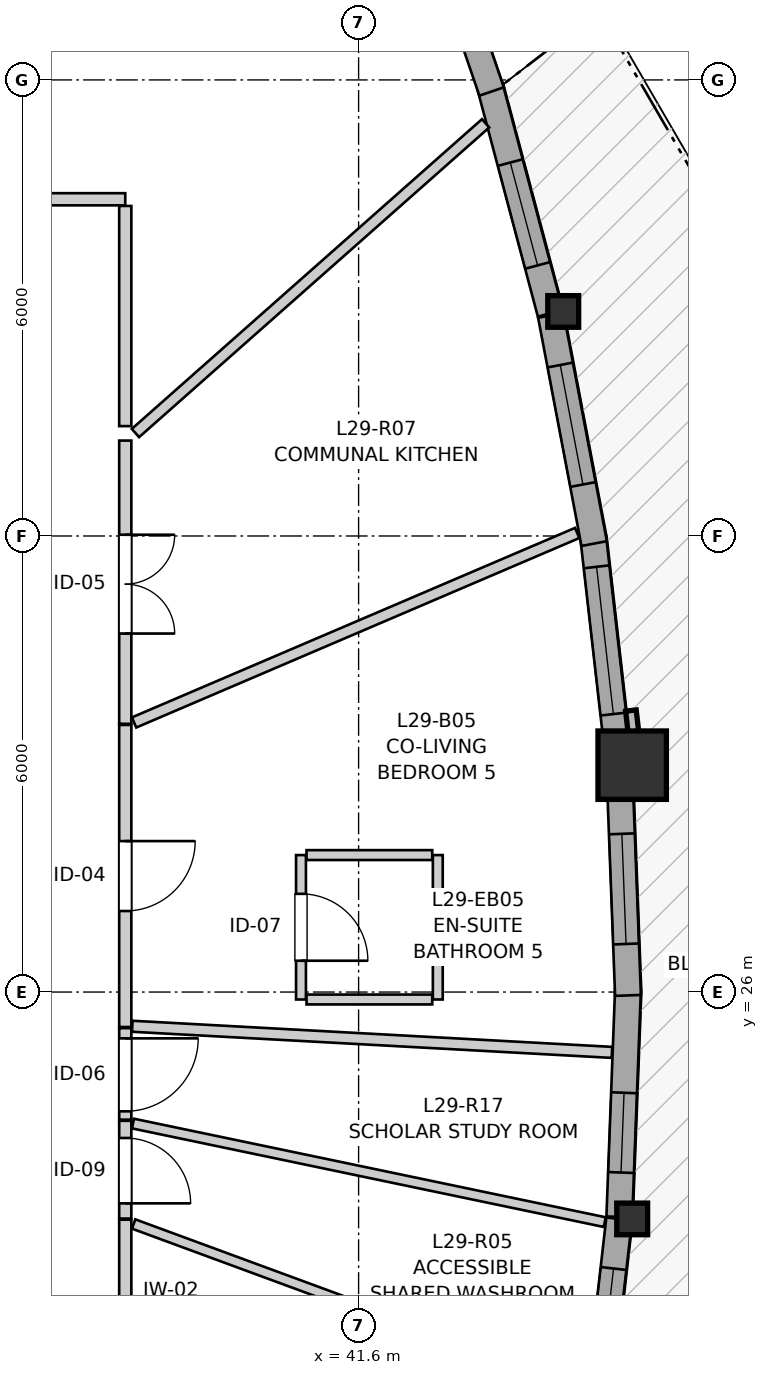
"""IFC4 building model, lengths in metres.
Left out: names, types, materials, properties, quantities, classifications, styles, units other than length and angle.
Written with IfcOpenShell. Run it as: python <this file> out.ifc"""

import sys

from ifc_helpers import new_model, si_unit, direction, frame, frame_2d, origin, origin_2d, place, context, subcontext, project, spatial, rectangle, i_section, extrude, source, transform, mapped, element, fill, save


model = new_model("IFC4")
c1 = context("Model", 3, precision=1e-05, world=origin(), true_north=direction((0.0, 1.0)))
c2 = subcontext(c1, "Body", "Model", "MODEL_VIEW")
j1 = project(units=[si_unit("LENGTHUNIT", "METRE"), si_unit("PLANEANGLEUNIT", "RADIAN")], contexts=[c1])
p1 = place(None, origin())
s1 = spatial("IfcSite", under=j1, at=p1, CompositionType="ELEMENT")
p2 = place(p1, origin())
s2 = spatial("IfcBuilding", under=s1, at=p2, CompositionType="ELEMENT")
p3 = place(p2, frame((0.0, 0.0, 99.2)))
s3 = spatial("IfcBuildingStorey", under=s2, at=p3, CompositionType="ELEMENT", Elevation=99.2)
m1 = source(origin(), c2, "Body", "SweptSolid", [
    extrude(i_section(OverallWidth=0.406, OverallDepth=0.416, WebThickness=0.027, FlangeThickness=0.044, FilletRadius=0.015, at=origin_2d()), origin(), (0.0, 0.0, 1.0), 2.95),
])
p4 = place(p3, frame((45.199, 23.015, 0.0), z_axis=(0.0, 0.0, 1.0), x_axis=(1.0, 0.0, 0.0)))
e1 = element("IfcColumn", 1, at=p4, inside=s3, PredefinedType="PILASTER", context=c2, shape_type="MappedRepresentation", body=[
    mapped(m1, transform((0.0, 0.0, 0.0), x_axis=(1.0, 0.0, 0.0), y_axis=(0.0, 1.0, 0.0), z_axis=(0.0, 0.0, 1.0), scale=1.0)),
])
m2 = source(origin(), c2, "Body", "SweptSolid", [
    extrude(rectangle(XDim=0.9, YDim=0.9, at=origin_2d()), origin(), (0.0, 0.0, 1.0), 2.95),
])
p5 = place(p3, frame((45.199, 28.985, 0.0), z_axis=(0.0, 0.0, 1.0), x_axis=(1.0, 0.0, 0.0)))
e2 = element("IfcColumn", 2, at=p5, inside=s3, PredefinedType="COLUMN", context=c2, shape_type="MappedRepresentation", body=[
    mapped(m2, transform((0.0, 0.0, 0.0), x_axis=(1.0, 0.0, 0.0), y_axis=(0.0, 1.0, 0.0), z_axis=(0.0, 0.0, 1.0), scale=1.0)),
])
p6 = place(p3, frame((44.292, 34.954, 0.0), z_axis=(0.0, 0.0, 1.0), x_axis=(1.0, 0.0, 0.0)))
e3 = element("IfcColumn", 3, at=p6, inside=s3, PredefinedType="PILASTER", context=c2, shape_type="MappedRepresentation", body=[
    mapped(m1, transform((0.0, 0.0, 0.0), x_axis=(1.0, 0.0, 0.0), y_axis=(0.0, 1.0, 0.0), z_axis=(0.0, 0.0, 1.0), scale=1.0)),
])
p7 = place(p3, frame((44.686, 20.012, 0.0), z_axis=(0.0, 0.0, 1.0), x_axis=(0.113268604106, 0.993564403209, 0.0)))
e4 = element("IfcWall", 4, at=p7, inside=s3, PredefinedType="SOLIDWALL", context=c2, shape_type="SweptSolid", body=[
    extrude(rectangle(XDim=3.022, YDim=0.34, at=frame_2d((1.511, 0.0))), origin(), (0.0, 0.0, 1.0), 2.48),
])
p8 = place(p7, frame((1.316, 0.0, 0.82)))
e5 = element("IfcOpeningElement", 5, at=p8, cuts=e4, PredefinedType="OPENING", context=c2, shape_type="SweptSolid", body=[
    extrude(rectangle(XDim=1.05, YDim=1.45, at=frame_2d((0.525, 0.725))), frame((0.0, 0.18, 0.0), z_axis=(0.0, -1.0, 0.0), x_axis=(1.0, 0.0, 0.0)), (0.0, 0.0, 1.0), 0.36),
])
p9 = place(p3, frame((45.031, 23.042, 0.0), z_axis=(0.0, 0.0, 1.0), x_axis=(0.037943223979, 0.999279896603, 0.0)))
e6 = element("IfcWall", 6, at=p9, inside=s3, PredefinedType="SOLIDWALL", context=c2, shape_type="SweptSolid", body=[
    extrude(rectangle(XDim=3.005, YDim=0.34, at=frame_2d((1.502, 0.0))), origin(), (0.0, 0.0, 1.0), 2.48),
])
p10 = place(p9, frame((0.584, 0.0, 0.82)))
e7 = element("IfcOpeningElement", 7, at=p10, cuts=e6, PredefinedType="OPENING", context=c2, shape_type="SweptSolid", body=[
    extrude(rectangle(XDim=1.05, YDim=1.45, at=frame_2d((0.525, 0.725))), frame((0.0, 0.18, 0.0), z_axis=(0.0, -1.0, 0.0), x_axis=(1.0, 0.0, 0.0)), (0.0, 0.0, 1.0), 0.36),
])
p11 = place(p3, frame((45.145, 25.956, 0.0), z_axis=(0.0, 0.0, 1.0), x_axis=(-0.038000333161, 0.9992777265, 0.0)))
e8 = element("IfcWall", 8, at=p11, inside=s3, PredefinedType="SOLIDWALL", context=c2, shape_type="SweptSolid", body=[
    extrude(rectangle(XDim=2.795, YDim=0.34, at=frame_2d((1.397, 0.0))), origin(), (0.0, 0.0, 1.0), 2.48),
])
p12 = place(p11, frame((0.677, 0.0, 0.82)))
e9 = element("IfcOpeningElement", 9, at=p12, cuts=e8, PredefinedType="OPENING", context=c2, shape_type="SweptSolid", body=[
    extrude(rectangle(XDim=1.45, YDim=1.25, at=frame_2d((0.725, 0.625))), frame((0.0, 0.18, 0.0), z_axis=(0.0, -1.0, 0.0), x_axis=(1.0, 0.0, 0.0)), (0.0, 0.0, 1.0), 0.36),
])
p13 = place(p3, frame((45.004, 29.194, 0.0), z_axis=(0.0, 0.0, 1.0), x_axis=(-0.113223342564, 0.993569562083, 0.0)))
e10 = element("IfcWall", 10, at=p13, inside=s3, PredefinedType="SOLIDWALL", context=c2, shape_type="SweptSolid", body=[
    extrude(rectangle(XDim=2.812, YDim=0.34, at=frame_2d((1.406, 0.0))), origin(), (0.0, 0.0, 1.0), 2.48),
])
p14 = place(p13, frame((0.466, 0.0, 0.82)))
e11 = element("IfcOpeningElement", 11, at=p14, cuts=e10, PredefinedType="OPENING", context=c2, shape_type="SweptSolid", body=[
    extrude(rectangle(XDim=1.95, YDim=1.4, at=frame_2d((0.975, 0.7))), frame((0.0, 0.18, 0.0), z_axis=(0.0, -1.0, 0.0), x_axis=(1.0, 0.0, 0.0)), (0.0, 0.0, 1.0), 0.36),
])
p15 = place(p3, frame((44.699, 31.9, 0.0), z_axis=(0.0, 0.0, 1.0), x_axis=(-0.186689944156, 0.982418884566, 0.0)))
e12 = element("IfcWall", 12, at=p15, inside=s3, PredefinedType="SOLIDWALL", context=c2, shape_type="SweptSolid", body=[
    extrude(rectangle(XDim=3.056, YDim=0.34, at=frame_2d((1.528, 0.0))), origin(), (0.0, 0.0, 1.0), 2.48),
])
p16 = place(p15, frame((0.791, 0.0, 0.82)))
e13 = element("IfcOpeningElement", 13, at=p16, cuts=e12, PredefinedType="OPENING", context=c2, shape_type="SweptSolid", body=[
    extrude(rectangle(XDim=1.6, YDim=1.35, at=frame_2d((0.8, 0.675))), frame((0.0, 0.18, 0.0), z_axis=(0.0, -1.0, 0.0), x_axis=(1.0, 0.0, 0.0)), (0.0, 0.0, 1.0), 0.36),
])
p17 = place(p3, frame((44.123, 34.93, 0.0), z_axis=(0.0, 0.0, 1.0), x_axis=(-0.257080487516, 0.96638999526, 0.0)))
e14 = element("IfcWall", 14, at=p17, inside=s3, PredefinedType="SOLIDWALL", context=c2, shape_type="SweptSolid", body=[
    extrude(rectangle(XDim=3.106, YDim=0.34, at=frame_2d((1.553, 0.0))), origin(), (0.0, 0.0, 1.0), 2.48),
])
p18 = place(p17, frame((0.652, 0.0, 0.82)))
e15 = element("IfcOpeningElement", 15, at=p18, cuts=e14, PredefinedType="OPENING", context=c2, shape_type="SweptSolid", body=[
    extrude(rectangle(XDim=1.4, YDim=1.35, at=frame_2d((0.7, 0.675))), frame((0.0, 0.18, 0.0), z_axis=(0.0, -1.0, 0.0), x_axis=(1.0, 0.0, 0.0)), (0.0, 0.0, 1.0), 0.36),
])
p19 = place(p3, frame((43.35, 37.848, 0.0), z_axis=(0.0, 0.0, 1.0), x_axis=(-0.323561473353, 0.946207151189, 0.0)))
e16 = element("IfcWall", 16, at=p19, inside=s3, PredefinedType="SOLIDWALL", context=c2, shape_type="SweptSolid", body=[
    extrude(rectangle(XDim=2.962, YDim=0.34, at=frame_2d((1.481, 0.0))), origin(), (0.0, 0.0, 1.0), 2.48),
])
p20 = place(p19, frame((0.861, 0.0, 0.82)))
e17 = element("IfcOpeningElement", 17, at=p20, cuts=e16, PredefinedType="OPENING", context=c2, shape_type="SweptSolid", body=[
    extrude(rectangle(XDim=1.25, YDim=1.35, at=frame_2d((0.625, 0.675))), frame((0.0, 0.18, 0.0), z_axis=(0.0, -1.0, 0.0), x_axis=(1.0, 0.0, 0.0)), (0.0, 0.0, 1.0), 0.36),
])
p21 = place(p3, frame((38.53, 23.005, 0.0), z_axis=(0.0, 0.0, 1.0), x_axis=(0.0, -1.0, 0.0)))
e18 = element("IfcWall", 18, at=p21, inside=s3, PredefinedType="PARTITIONING", context=c2, shape_type="SweptSolid", body=[
    extrude(rectangle(XDim=6.157, YDim=0.16, at=frame_2d((3.079, 0.0))), origin(), (0.0, 0.0, 1.0), 2.95),
])
p22 = place(p21, frame((2.615, 0.0, 0.0)))
e19 = element("IfcOpeningElement", 19, at=p22, cuts=e18, PredefinedType="OPENING", context=c2, shape_type="SweptSolid", body=[
    extrude(rectangle(XDim=0.92, YDim=2.1, at=frame_2d((0.46, 1.05))), frame((0.0, 0.09, 0.0), z_axis=(0.0, -1.0, 0.0), x_axis=(1.0, 0.0, 0.0)), (0.0, 0.0, 1.0), 0.18),
])
p23 = place(p3, frame((33.906, 36.43, 0.0), z_axis=(0.0, 0.0, 1.0), x_axis=(1.0, 0.0, 0.0)))
e20 = element("IfcWall", 20, at=p23, inside=s3, PredefinedType="PARTITIONING", context=c2, shape_type="SweptSolid", body=[
    extrude(rectangle(XDim=4.624, YDim=0.16, at=frame_2d((2.312, 0.0))), origin(), (0.0, 0.0, 1.0), 2.588),
])
p24 = place(p23, frame((1.84, 0.0, 0.0)))
e21 = element("IfcOpeningElement", 21, at=p24, cuts=e20, PredefinedType="OPENING", context=c2, shape_type="SweptSolid", body=[
    extrude(rectangle(XDim=0.96, YDim=2.1, at=frame_2d((0.48, 1.05))), frame((0.0, 0.09, 0.0), z_axis=(0.0, -1.0, 0.0), x_axis=(1.0, 0.0, 0.0)), (0.0, 0.0, 1.0), 0.18),
])
p25 = place(p3, frame((38.53, 29.514, 0.0), z_axis=(0.0, 0.0, 1.0), x_axis=(0.0, -1.0, 0.0)))
e22 = element("IfcWall", 22, at=p25, inside=s3, PredefinedType="PARTITIONING", context=c2, shape_type="SweptSolid", body=[
    extrude(rectangle(XDim=3.974, YDim=0.16, at=frame_2d((1.987, 0.0))), origin(), (0.0, 0.0, 1.0), 2.95),
])
p26 = place(p25, frame((1.528, 0.0, 0.0)))
e23 = element("IfcOpeningElement", 23, at=p26, cuts=e22, PredefinedType="OPENING", context=c2, shape_type="SweptSolid", body=[
    extrude(rectangle(XDim=0.92, YDim=2.1, at=frame_2d((0.46, 1.05))), frame((0.0, 0.09, 0.0), z_axis=(0.0, -1.0, 0.0), x_axis=(1.0, 0.0, 0.0)), (0.0, 0.0, 1.0), 0.18),
])
p27 = place(p3, frame((38.53, 33.255, 0.0), z_axis=(0.0, 0.0, 1.0), x_axis=(0.0, -1.0, 0.0)))
e24 = element("IfcWall", 24, at=p27, inside=s3, PredefinedType="PARTITIONING", context=c2, shape_type="SweptSolid", body=[
    extrude(rectangle(XDim=3.726, YDim=0.16, at=frame_2d((1.863, 0.0))), origin(), (0.0, 0.0, 1.0), 2.95),
])
p28 = place(p27, frame((1.239, 0.0, 0.0)))
e25 = element("IfcOpeningElement", 25, at=p28, cuts=e24, PredefinedType="OPENING", context=c2, shape_type="SweptSolid", body=[
    extrude(rectangle(XDim=1.3, YDim=2.1, at=frame_2d((0.65, 1.05))), frame((0.0, 0.09, 0.0), z_axis=(0.0, -1.0, 0.0), x_axis=(1.0, 0.0, 0.0)), (0.0, 0.0, 1.0), 0.18),
])
p29 = place(p3, frame((40.842, 27.802, 0.0), z_axis=(0.0, 0.0, 1.0), x_axis=(0.0, -1.0, 0.0)))
e26 = element("IfcWall", 26, at=p29, inside=s3, PredefinedType="PARTITIONING", context=c2, shape_type="SweptSolid", body=[
    extrude(rectangle(XDim=1.9, YDim=0.13, at=frame_2d((0.95, 0.0))), origin(), (0.0, 0.0, 1.0), 2.95),
])
p30 = place(p29, frame((0.51, 0.0, 0.0)))
e27 = element("IfcOpeningElement", 27, at=p30, cuts=e26, PredefinedType="OPENING", context=c2, shape_type="SweptSolid", body=[
    extrude(rectangle(XDim=0.88, YDim=2.05, at=frame_2d((0.44, 1.025))), frame((0.0, 0.075, 0.0), z_axis=(0.0, -1.0, 0.0), x_axis=(1.0, 0.0, 0.0)), (0.0, 0.0, 1.0), 0.15),
])
p31 = place(p3, frame((38.53, 24.306, 0.0), z_axis=(0.0, 0.0, 1.0), x_axis=(0.0, -1.0, 0.0)))
e28 = element("IfcWall", 28, at=p31, inside=s3, PredefinedType="PARTITIONING", context=c2, shape_type="SweptSolid", body=[
    extrude(rectangle(XDim=1.286, YDim=0.16, at=frame_2d((0.643, 0.0))), origin(), (0.0, 0.0, 1.0), 2.95),
])
p32 = place(p31, frame((0.226, 0.0, 0.0)))
e29 = element("IfcOpeningElement", 29, at=p32, cuts=e28, PredefinedType="OPENING", context=c2, shape_type="SweptSolid", body=[
    extrude(rectangle(XDim=0.86, YDim=2.05, at=frame_2d((0.43, 1.025))), frame((0.0, 0.09, 0.0), z_axis=(0.0, -1.0, 0.0), x_axis=(1.0, 0.0, 0.0)), (0.0, 0.0, 1.0), 0.18),
])
p33 = place(p3, frame((38.53, 25.525, 0.0), z_axis=(0.0, 0.0, 1.0), x_axis=(0.0, -1.0, 0.0)))
e30 = element("IfcWall", 30, at=p33, inside=s3, PredefinedType="PARTITIONING", context=c2, shape_type="SweptSolid", body=[
    extrude(rectangle(XDim=1.204, YDim=0.16, at=frame_2d((0.602, 0.0))), origin(), (0.0, 0.0, 1.0), 2.95),
])
p34 = place(p33, frame((0.134, 0.0, 0.0)))
e31 = element("IfcOpeningElement", 31, at=p34, cuts=e30, PredefinedType="OPENING", context=c2, shape_type="SweptSolid", body=[
    extrude(rectangle(XDim=0.96, YDim=2.1, at=frame_2d((0.48, 1.05))), frame((0.0, 0.09, 0.0), z_axis=(0.0, -1.0, 0.0), x_axis=(1.0, 0.0, 0.0)), (0.0, 0.0, 1.0), 0.18),
])
p35 = place(p3, frame((38.646, 29.546, 0.0), z_axis=(0.0, 0.0, 1.0), x_axis=(0.919441504603, 0.393226804293, 0.0)))
e32 = element("IfcWall", 32, at=p35, inside=s3, PredefinedType="PARTITIONING", context=c2, shape_type="SweptSolid", body=[
    extrude(rectangle(XDim=6.341, YDim=0.145, at=frame_2d((3.17, 0.0))), origin(), (0.0, 0.0, 1.0), 2.95),
])
p36 = place(p3, frame((38.64, 22.948, 0.0), z_axis=(0.0, 0.0, 1.0), x_axis=(0.938426101424, -0.3454800315, 0.0)))
e33 = element("IfcWall", 33, at=p36, inside=s3, PredefinedType="PARTITIONING", context=c2, shape_type="SweptSolid", body=[
    extrude(rectangle(XDim=6.327, YDim=0.13, at=frame_2d((3.164, 0.0))), origin(), (0.0, 0.0, 1.0), 2.95),
])
p37 = place(p3, frame((38.631, 24.27, 0.0), z_axis=(0.0, 0.0, 1.0), x_axis=(0.978856283814, -0.204549201019, 0.0)))
e34 = element("IfcWall", 34, at=p37, inside=s3, PredefinedType="PARTITIONING", context=c2, shape_type="SweptSolid", body=[
    extrude(rectangle(XDim=6.341, YDim=0.13, at=frame_2d((3.171, 0.0))), origin(), (0.0, 0.0, 1.0), 2.95),
])
p38 = place(p3, frame((38.622, 25.55, 0.0), z_axis=(0.0, 0.0, 1.0), x_axis=(0.998518036703, -0.054421782211, 0.0)))
e35 = element("IfcWall", 35, at=p38, inside=s3, PredefinedType="PARTITIONING", context=c2, shape_type="SweptSolid", body=[
    extrude(rectangle(XDim=6.321, YDim=0.145, at=frame_2d((3.16, 0.0))), origin(), (0.0, 0.0, 1.0), 2.95),
])
p39 = place(p3, frame((38.664, 33.354, 0.0), z_axis=(0.0, 0.0, 1.0), x_axis=(0.749069296105, 0.662491652501, 0.0)))
e36 = element("IfcWall", 36, at=p39, inside=s3, PredefinedType="PARTITIONING", context=c2, shape_type="SweptSolid", body=[
    extrude(rectangle(XDim=6.15, YDim=0.145, at=frame_2d((3.075, 0.0))), origin(), (0.0, 0.0, 1.0), 2.95),
])
p40 = place(p3, frame((38.53, 33.446, 0.0), z_axis=(0.0, 0.0, 1.0), x_axis=(0.0, 1.0, 0.0)))
e37 = element("IfcWall", 37, at=p40, inside=s3, PredefinedType="PARTITIONING", context=c2, shape_type="SweptSolid", body=[
    extrude(rectangle(XDim=2.896, YDim=0.16, at=frame_2d((1.448, 0.0))), origin(), (0.0, 0.0, 1.0), 2.588),
])
p41 = place(p3, frame((42.642, 25.902, 0.0), z_axis=(0.0, 0.0, 1.0), x_axis=(0.0, 1.0, 0.0)))
e38 = element("IfcWall", 38, at=p41, inside=s3, PredefinedType="PARTITIONING", context=c2, shape_type="SweptSolid", body=[
    extrude(rectangle(XDim=1.9, YDim=0.13, at=frame_2d((0.95, 0.0))), origin(), (0.0, 0.0, 1.0), 2.558),
])
for number, where, z_axis, x_axis in (
    (39, (40.915, 27.802, 0.0), (0.0, 0.0, 1.0), (1.0, 0.0, 0.0)),
    (40, (40.915, 25.902, 0.0), (0.0, 0.0, 1.0), (1.0, 0.0, 0.0)),
):
    element("IfcWall", number, at=place(p3, frame(where, z_axis=z_axis, x_axis=x_axis)), inside=s3, PredefinedType="PARTITIONING", context=c2, shape_type="SweptSolid", body=[
        extrude(rectangle(XDim=1.654, YDim=0.13, at=frame_2d((0.827, 0.0))), origin(), (0.0, 0.0, 1.0), 2.95),
    ])
m3 = source(origin(), c2, "Body", "SweptSolid", [
    extrude(rectangle(XDim=1.05, YDim=1.45, at=frame_2d((0.525, 0.725))), frame((0.0, 0.03, 0.0), z_axis=(0.0, -1.0, 0.0), x_axis=(1.0, 0.0, 0.0)), (0.0, 0.0, 1.0), 0.06),
])
p42 = place(p8, origin())
e41 = element("IfcWindow", 41, at=p42, inside=s3, PartitioningType="SINGLE_PANEL", PredefinedType="WINDOW", context=c2, shape_type="MappedRepresentation", body=[
    mapped(m3, transform((0.0, 0.0, 0.0), x_axis=(1.0, 0.0, 0.0), y_axis=(0.0, 1.0, 0.0), z_axis=(0.0, 0.0, 1.0), scale=1.0)),
])
fill(e5, e41)
p43 = place(p10, origin())
e42 = element("IfcWindow", 42, at=p43, inside=s3, PartitioningType="SINGLE_PANEL", PredefinedType="WINDOW", context=c2, shape_type="MappedRepresentation", body=[
    mapped(m3, transform((0.0, 0.0, 0.0), x_axis=(1.0, 0.0, 0.0), y_axis=(0.0, 1.0, 0.0), z_axis=(0.0, 0.0, 1.0), scale=1.0)),
])
fill(e7, e42)
m4 = source(origin(), c2, "Body", "SweptSolid", [
    extrude(rectangle(XDim=1.45, YDim=1.25, at=frame_2d((0.725, 0.625))), frame((0.0, 0.03, 0.0), z_axis=(0.0, -1.0, 0.0), x_axis=(1.0, 0.0, 0.0)), (0.0, 0.0, 1.0), 0.06),
])
p44 = place(p12, origin())
e43 = element("IfcWindow", 43, at=p44, inside=s3, PartitioningType="SINGLE_PANEL", PredefinedType="WINDOW", context=c2, shape_type="MappedRepresentation", body=[
    mapped(m4, transform((0.0, 0.0, 0.0), x_axis=(1.0, 0.0, 0.0), y_axis=(0.0, 1.0, 0.0), z_axis=(0.0, 0.0, 1.0), scale=1.0)),
])
fill(e9, e43)
m5 = source(origin(), c2, "Body", "SweptSolid", [
    extrude(rectangle(XDim=1.95, YDim=1.4, at=frame_2d((0.975, 0.7))), frame((0.0, 0.03, 0.0), z_axis=(0.0, -1.0, 0.0), x_axis=(1.0, 0.0, 0.0)), (0.0, 0.0, 1.0), 0.06),
])
p45 = place(p14, origin())
e44 = element("IfcWindow", 44, at=p45, inside=s3, PartitioningType="SINGLE_PANEL", PredefinedType="WINDOW", context=c2, shape_type="MappedRepresentation", body=[
    mapped(m5, transform((0.0, 0.0, 0.0), x_axis=(1.0, 0.0, 0.0), y_axis=(0.0, 1.0, 0.0), z_axis=(0.0, 0.0, 1.0), scale=1.0)),
])
fill(e11, e44)
m6 = source(origin(), c2, "Body", "SweptSolid", [
    extrude(rectangle(XDim=1.6, YDim=1.35, at=frame_2d((0.8, 0.675))), frame((0.0, 0.03, 0.0), z_axis=(0.0, -1.0, 0.0), x_axis=(1.0, 0.0, 0.0)), (0.0, 0.0, 1.0), 0.06),
])
p46 = place(p16, origin())
e45 = element("IfcWindow", 45, at=p46, inside=s3, PartitioningType="SINGLE_PANEL", PredefinedType="WINDOW", context=c2, shape_type="MappedRepresentation", body=[
    mapped(m6, transform((0.0, 0.0, 0.0), x_axis=(1.0, 0.0, 0.0), y_axis=(0.0, 1.0, 0.0), z_axis=(0.0, 0.0, 1.0), scale=1.0)),
])
fill(e13, e45)
m7 = source(origin(), c2, "Body", "SweptSolid", [
    extrude(rectangle(XDim=1.4, YDim=1.35, at=frame_2d((0.7, 0.675))), frame((0.0, 0.03, 0.0), z_axis=(0.0, -1.0, 0.0), x_axis=(1.0, 0.0, 0.0)), (0.0, 0.0, 1.0), 0.06),
])
p47 = place(p18, origin())
e46 = element("IfcWindow", 46, at=p47, inside=s3, PartitioningType="SINGLE_PANEL", PredefinedType="WINDOW", context=c2, shape_type="MappedRepresentation", body=[
    mapped(m7, transform((0.0, 0.0, 0.0), x_axis=(1.0, 0.0, 0.0), y_axis=(0.0, 1.0, 0.0), z_axis=(0.0, 0.0, 1.0), scale=1.0)),
])
fill(e15, e46)
m8 = source(origin(), c2, "Body", "SweptSolid", [
    extrude(rectangle(XDim=0.92, YDim=2.1, at=frame_2d((0.46, 1.05))), frame((0.0, 0.025, 0.0), z_axis=(0.0, -1.0, 0.0), x_axis=(1.0, 0.0, 0.0)), (0.0, 0.0, 1.0), 0.05),
])
p48 = place(p26, origin())
e47 = element("IfcDoor", 47, at=p48, inside=s3, OperationType="SINGLE_SWING_LEFT", PredefinedType="DOOR", context=c2, shape_type="MappedRepresentation", body=[
    mapped(m8, transform((0.0, 0.0, 0.0), x_axis=(1.0, 0.0, 0.0), y_axis=(0.0, 1.0, 0.0), z_axis=(0.0, 0.0, 1.0), scale=1.0)),
])
fill(e23, e47)
m9 = source(origin(), c2, "Body", "SweptSolid", [
    extrude(rectangle(XDim=1.3, YDim=2.1, at=frame_2d((0.65, 1.05))), frame((0.0, 0.025, 0.0), z_axis=(0.0, -1.0, 0.0), x_axis=(1.0, 0.0, 0.0)), (0.0, 0.0, 1.0), 0.05),
])
p49 = place(p28, origin())
e48 = element("IfcDoor", 48, at=p49, inside=s3, OperationType="DOUBLE_DOOR_SINGLE_SWING", PredefinedType="DOOR", context=c2, shape_type="MappedRepresentation", body=[
    mapped(m9, transform((0.0, 0.0, 0.0), x_axis=(1.0, 0.0, 0.0), y_axis=(0.0, 1.0, 0.0), z_axis=(0.0, 0.0, 1.0), scale=1.0)),
])
fill(e25, e48)
m10 = source(origin(), c2, "Body", "SweptSolid", [
    extrude(rectangle(XDim=0.88, YDim=2.05, at=frame_2d((0.44, 1.025))), frame((0.0, 0.025, 0.0), z_axis=(0.0, -1.0, 0.0), x_axis=(1.0, 0.0, 0.0)), (0.0, 0.0, 1.0), 0.05),
])
p50 = place(p30, origin())
e49 = element("IfcDoor", 49, at=p50, inside=s3, OperationType="SINGLE_SWING_RIGHT", PredefinedType="DOOR", context=c2, shape_type="MappedRepresentation", body=[
    mapped(m10, transform((0.0, 0.0, 0.0), x_axis=(1.0, 0.0, 0.0), y_axis=(0.0, 1.0, 0.0), z_axis=(0.0, 0.0, 1.0), scale=1.0)),
])
fill(e27, e49)
m11 = source(origin(), c2, "Body", "SweptSolid", [
    extrude(rectangle(XDim=0.86, YDim=2.05, at=frame_2d((0.43, 1.025))), frame((0.0, 0.025, 0.0), z_axis=(0.0, -1.0, 0.0), x_axis=(1.0, 0.0, 0.0)), (0.0, 0.0, 1.0), 0.05),
])
p51 = place(p32, origin())
e50 = element("IfcDoor", 50, at=p51, inside=s3, OperationType="SINGLE_SWING_RIGHT", PredefinedType="DOOR", context=c2, shape_type="MappedRepresentation", body=[
    mapped(m11, transform((0.0, 0.0, 0.0), x_axis=(1.0, 0.0, 0.0), y_axis=(0.0, 1.0, 0.0), z_axis=(0.0, 0.0, 1.0), scale=1.0)),
])
fill(e29, e50)
m12 = source(origin(), c2, "Body", "SweptSolid", [
    extrude(rectangle(XDim=0.96, YDim=2.1, at=frame_2d((0.48, 1.05))), frame((0.0, 0.025, 0.0), z_axis=(0.0, -1.0, 0.0), x_axis=(1.0, 0.0, 0.0)), (0.0, 0.0, 1.0), 0.05),
])
p52 = place(p34, origin())
e51 = element("IfcDoor", 51, at=p52, inside=s3, OperationType="SINGLE_SWING_LEFT", PredefinedType="DOOR", context=c2, shape_type="MappedRepresentation", body=[
    mapped(m12, transform((0.0, 0.0, 0.0), x_axis=(1.0, 0.0, 0.0), y_axis=(0.0, 1.0, 0.0), z_axis=(0.0, 0.0, 1.0), scale=1.0)),
])
fill(e31, e51)
save(model, sys.argv[1])
